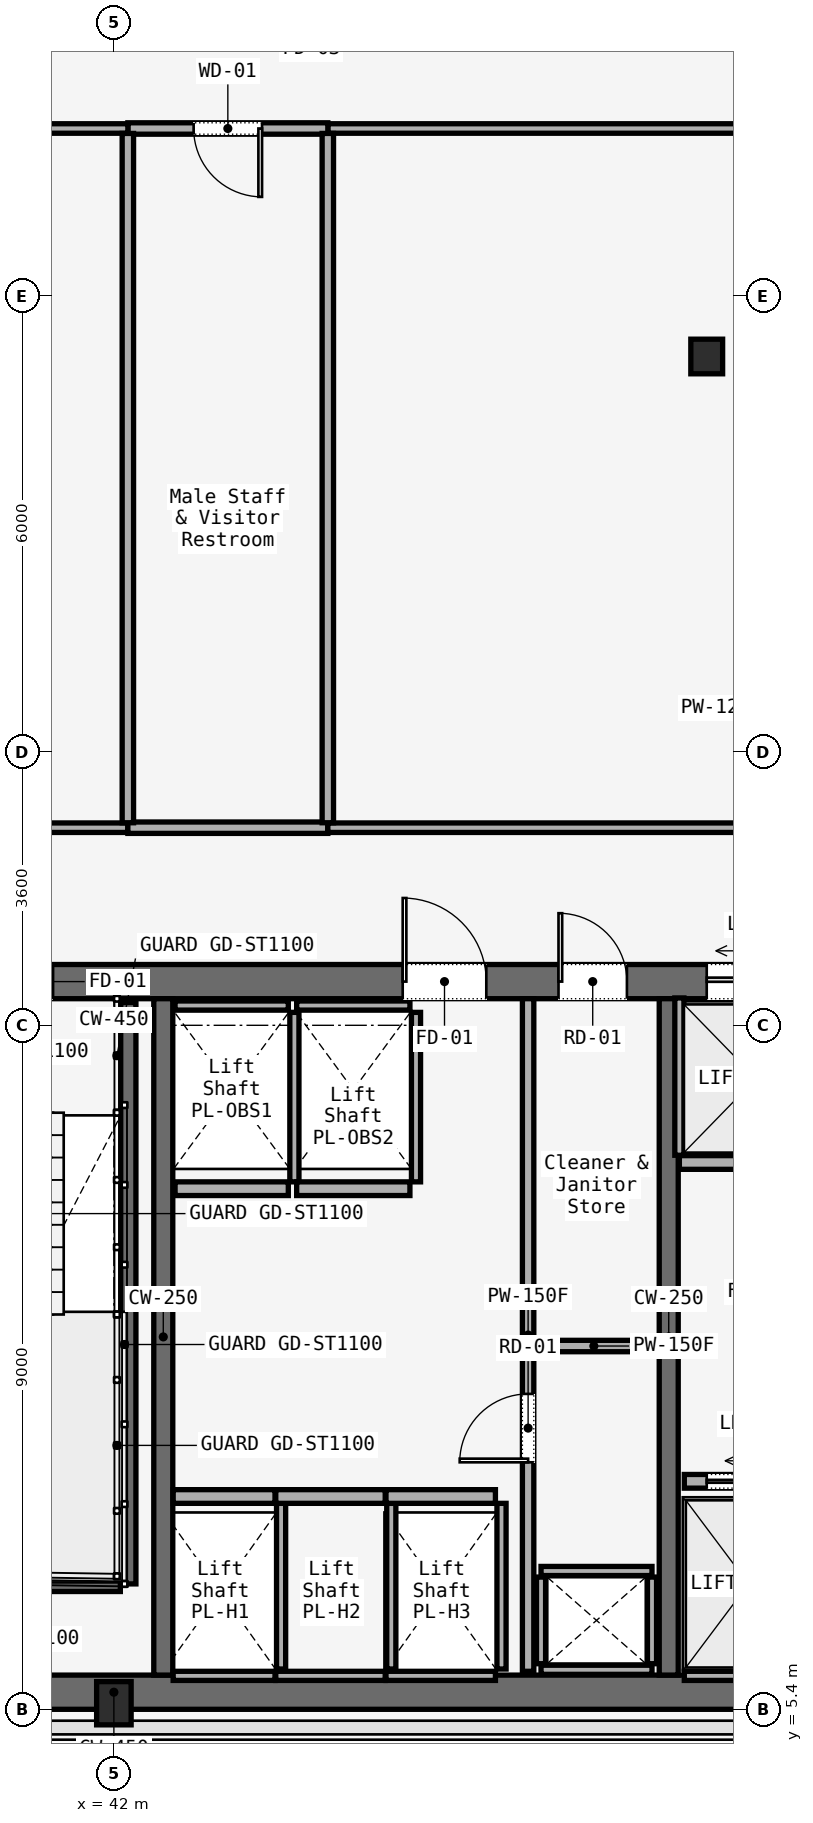
"""IFC4 building model, lengths in metres.
Left out: names, types, materials, properties, quantities, classifications, styles, units other than length and angle.
Written with IfcOpenShell. Run it as: python <this file> out.ifc"""

import sys

from ifc_helpers import new_model, si_unit, direction, frame, frame_2d, origin, origin_2d, place, context, subcontext, project, spatial, rectangle, i_section, extrude, element, fill, save


model = new_model("IFC4")
c1 = context("Model", 3, precision=1e-05, world=origin(), true_north=direction((0.0, 1.0)))
c2 = subcontext(c1, "Body", "Model", "MODEL_VIEW")
j1 = project(units=[si_unit("LENGTHUNIT", "METRE"), si_unit("PLANEANGLEUNIT", "RADIAN")], contexts=[c1])
p1 = place(None, origin())
s1 = spatial("IfcSite", under=j1, at=p1, CompositionType="ELEMENT")
p2 = place(p1, origin())
s2 = spatial("IfcBuilding", under=s1, at=p2, CompositionType="ELEMENT")
p3 = place(p2, frame((0.0, 0.0, 66.4)))
s3 = spatial("IfcBuildingStorey", under=s2, at=p3, CompositionType="ELEMENT", Elevation=66.4)
p4 = place(p3, frame((26.45, 14.975, 0.0), z_axis=(0.0, 0.0, 1.0), x_axis=(1.0, 0.0, 0.0)))
e1 = element("IfcWall", 1, at=p4, inside=s3, PredefinedType="SOLIDWALL", context=c2, shape_type="SweptSolid", body=[
    extrude(rectangle(XDim=31.1, YDim=0.45, at=frame_2d((15.55, 0.0))), origin(), (0.0, 0.0, 1.0), 3.58),
])
p5 = place(p4, frame((1.65, 0.0, 0.0)))
e2 = element("IfcOpeningElement", 2, at=p5, cuts=e1, PredefinedType="OPENING", context=c2, shape_type="SweptSolid", body=[
    extrude(rectangle(XDim=1.1, YDim=2.2, at=frame_2d((0.55, 1.1))), frame((0.0, 0.225, 0.0), z_axis=(0.0, -1.0, 0.0), x_axis=(1.0, 0.0, 0.0)), (0.0, 0.0, 1.0), 0.45),
])
p6 = place(p4, frame((13.65, 0.0, 0.0)))
e3 = element("IfcOpeningElement", 3, at=p6, cuts=e1, PredefinedType="OPENING", context=c2, shape_type="SweptSolid", body=[
    extrude(rectangle(XDim=1.1, YDim=2.2, at=frame_2d((0.55, 1.1))), frame((0.0, 0.225, 0.0), z_axis=(0.0, -1.0, 0.0), x_axis=(1.0, 0.0, 0.0)), (0.0, 0.0, 1.0), 0.45),
])
p7 = place(p4, frame((25.55, 0.0, 0.0)))
e4 = element("IfcOpeningElement", 4, at=p7, cuts=e1, PredefinedType="OPENING", context=c2, shape_type="SweptSolid", body=[
    extrude(rectangle(XDim=1.1, YDim=2.2, at=frame_2d((0.55, 1.1))), frame((0.0, 0.225, 0.0), z_axis=(0.0, -1.0, 0.0), x_axis=(1.0, 0.0, 0.0)), (0.0, 0.0, 1.0), 0.45),
])
p8 = place(p4, frame((10.7, 0.0, 0.0)))
e5 = element("IfcOpeningElement", 5, at=p8, cuts=e1, PredefinedType="OPENING", context=c2, shape_type="SweptSolid", body=[
    extrude(rectangle(XDim=1.4, YDim=2.2, at=frame_2d((0.7, 1.1))), frame((0.0, 0.225, 0.0), z_axis=(0.0, -1.0, 0.0), x_axis=(1.0, 0.0, 0.0)), (0.0, 0.0, 1.0), 0.45),
])
p9 = place(p4, frame((19.35, 0.0, 0.0)))
e6 = element("IfcOpeningElement", 6, at=p9, cuts=e1, PredefinedType="OPENING", context=c2, shape_type="SweptSolid", body=[
    extrude(rectangle(XDim=1.1, YDim=2.2, at=frame_2d((0.55, 1.1))), frame((0.0, 0.225, 0.0), z_axis=(0.0, -1.0, 0.0), x_axis=(1.0, 0.0, 0.0)), (0.0, 0.0, 1.0), 0.45),
])
p10 = place(p4, frame((21.4, 0.0, 0.0)))
e7 = element("IfcOpeningElement", 7, at=p10, cuts=e1, PredefinedType="OPENING", context=c2, shape_type="SweptSolid", body=[
    extrude(rectangle(XDim=0.9, YDim=2.1, at=frame_2d((0.45, 1.05))), frame((0.0, 0.225, 0.0), z_axis=(0.0, -1.0, 0.0), x_axis=(1.0, 0.0, 0.0)), (0.0, 0.0, 1.0), 0.45),
])
p11 = place(p4, frame((23.35, 0.0, 0.0)))
e8 = element("IfcOpeningElement", 8, at=p11, cuts=e1, PredefinedType="OPENING", context=c2, shape_type="SweptSolid", body=[
    extrude(rectangle(XDim=1.3, YDim=2.3, at=frame_2d((0.65, 1.15))), frame((0.0, 0.225, 0.0), z_axis=(0.0, -1.0, 0.0), x_axis=(1.0, 0.0, 0.0)), (0.0, 0.0, 1.0), 0.45),
])
p12 = place(p3, frame((26.45, 5.625, 0.0), z_axis=(0.0, 0.0, 1.0), x_axis=(1.0, 0.0, 0.0)))
e9 = element("IfcWall", 9, at=p12, inside=s3, PredefinedType="SOLIDWALL", context=c2, shape_type="SweptSolid", body=[
    extrude(rectangle(XDim=31.1, YDim=0.45, at=frame_2d((15.55, 0.0))), origin(), (0.0, 0.0, 1.0), 3.58),
])
for number, where, z_axis, x_axis in (
    (10, (42.65, 5.85, 0.0), (0.0, 0.0, 1.0), (0.0, 1.0, 0.0)),
    (11, (49.3, 5.85, 0.0), (0.0, 0.0, 1.0), (0.0, 1.0, 0.0)),
):
    element("IfcWall", number, at=place(p3, frame(where, z_axis=z_axis, x_axis=x_axis)), inside=s3, PredefinedType="SOLIDWALL", context=c2, shape_type="SweptSolid", body=[
        extrude(rectangle(XDim=8.9, YDim=0.25, at=frame_2d((4.45, 0.0))), origin(), (0.0, 0.0, 1.0), 3.58),
    ])
p13 = place(p3, frame((49.8, 23.2, 0.0), z_axis=(0.0, 0.0, 1.0), x_axis=(1.0, 0.0, 0.0)))
e12 = element("IfcColumn", 12, at=p13, inside=s3, PredefinedType="COLUMN", context=c2, shape_type="SweptSolid", body=[
    extrude(i_section(OverallWidth=0.418, OverallDepth=0.456, WebThickness=0.042, FlangeThickness=0.067, FilletRadius=0.015, at=origin_2d()), origin(), (0.0, 0.0, 1.0), 3.58),
])
p14 = place(p3, frame((42.0, 5.48, 0.0), z_axis=(0.0, 0.0, 1.0), x_axis=(1.0, 0.0, 0.0)))
e13 = element("IfcColumn", 13, at=p14, inside=s3, PredefinedType="COLUMN", context=c2, shape_type="SweptSolid", body=[
    extrude(i_section(OverallWidth=0.454, OverallDepth=0.569, WebThickness=0.078, FlangeThickness=0.08, FilletRadius=0.015, at=origin_2d()), origin(), (0.0, 0.0, 1.0), 3.58),
])
p15 = place(p3, frame((42.19, 14.7, 0.0), z_axis=(0.0, 0.0, 1.0), x_axis=(0.0, -1.0, 0.0)))
e14 = element("IfcWall", 14, at=p15, inside=s3, PredefinedType="SOLIDWALL", context=c2, shape_type="SweptSolid", body=[
    extrude(rectangle(XDim=7.65, YDim=0.2, at=frame_2d((3.825, 0.0))), origin(), (0.0, 0.0, 1.0), 3.8),
])
p16 = place(p3, frame((38.97, 7.05, 0.0), z_axis=(0.0, 0.0, 1.0), x_axis=(1.0, 0.0, 0.0)))
e15 = element("IfcWall", 15, at=p16, inside=s3, PredefinedType="SOLIDWALL", context=c2, shape_type="SweptSolid", body=[
    extrude(rectangle(XDim=3.115, YDim=0.2, at=frame_2d((1.558, 0.0))), origin(), (0.0, 0.0, 1.0), 3.8),
])
for number, where, z_axis, x_axis in (
    (16, (47.62, 5.92, 0.0), (0.0, 0.0, 1.0), (1.0, 0.0, 0.0)),
    (17, (47.62, 7.22, 0.0), (0.0, 0.0, 1.0), (1.0, 0.0, 0.0)),
):
    element("IfcWall", number, at=place(p3, frame(where, z_axis=z_axis, x_axis=x_axis)), inside=s3, PredefinedType="SOLIDWALL", context=c2, shape_type="SweptSolid", body=[
        extrude(rectangle(XDim=1.46, YDim=0.12, at=frame_2d((0.73, 0.0))), origin(), (0.0, 0.0, 1.0), 2.95),
    ])
for number, where, z_axis, x_axis in (
    (18, (47.62, 6.0, 0.0), (0.0, 0.0, 1.0), (0.0, 1.0, 0.0)),
    (19, (49.08, 6.0, 0.0), (0.0, 0.0, 1.0), (0.0, 1.0, 0.0)),
):
    element("IfcWall", number, at=place(p3, frame(where, z_axis=z_axis, x_axis=x_axis)), inside=s3, PredefinedType="SOLIDWALL", context=c2, shape_type="SweptSolid", body=[
        extrude(rectangle(XDim=1.14, YDim=0.12, at=frame_2d((0.57, 0.0))), origin(), (0.0, 0.0, 1.0), 2.95),
    ])
p17 = place(p3, frame((47.45, 5.9, 0.0), z_axis=(0.0, 0.0, 1.0), x_axis=(0.0, 1.0, 0.0)))
e20 = element("IfcWall", 20, at=p17, inside=s3, PredefinedType="PARTITIONING", context=c2, shape_type="SweptSolid", body=[
    extrude(rectangle(XDim=8.85, YDim=0.15, at=frame_2d((4.425, 0.0))), origin(), (0.0, 0.0, 1.0), 2.95),
])
p18 = place(p17, frame((2.75, 0.0, 0.0)))
e21 = element("IfcOpeningElement", 21, at=p18, cuts=e20, PredefinedType="OPENING", context=c2, shape_type="SweptSolid", body=[
    extrude(rectangle(XDim=0.9, YDim=2.1, at=frame_2d((0.45, 1.05))), frame((0.0, 0.075, 0.0), z_axis=(0.0, -1.0, 0.0), x_axis=(1.0, 0.0, 0.0)), (0.0, 0.0, 1.0), 0.15),
])
p19 = place(p3, frame((47.45, 10.18, 0.0), z_axis=(0.0, 0.0, 1.0), x_axis=(1.0, 0.0, 0.0)))
e22 = element("IfcWall", 22, at=p19, inside=s3, PredefinedType="PARTITIONING", context=c2, shape_type="SweptSolid", body=[
    extrude(rectangle(XDim=1.73, YDim=0.15, at=frame_2d((0.865, 0.0))), origin(), (0.0, 0.0, 1.0), 2.95),
])
p20 = place(p3, frame((42.78, 8.2, 0.0), z_axis=(0.0, 0.0, 1.0), x_axis=(1.0, 0.0, 0.0)))
e23 = element("IfcWall", 23, at=p20, inside=s3, PredefinedType="SOLIDWALL", context=c2, shape_type="SweptSolid", body=[
    extrude(rectangle(XDim=1.34, YDim=0.18, at=frame_2d((0.67, 0.0))), origin(), (0.0, 0.0, 1.0), 2.95),
])
p21 = place(p3, frame((42.78, 5.84, 0.0), z_axis=(0.0, 0.0, 1.0), x_axis=(1.0, 0.0, 0.0)))
e24 = element("IfcWall", 24, at=p21, inside=s3, PredefinedType="SOLIDWALL", context=c2, shape_type="SweptSolid", body=[
    extrude(rectangle(XDim=1.34, YDim=0.12, at=frame_2d((0.67, 0.0))), origin(), (0.0, 0.0, 1.0), 2.95),
])
p22 = place(p3, frame((44.2, 5.93, 0.0), z_axis=(0.0, 0.0, 1.0), x_axis=(0.0, 1.0, 0.0)))
e25 = element("IfcWall", 25, at=p22, inside=s3, PredefinedType="SOLIDWALL", context=c2, shape_type="SweptSolid", body=[
    extrude(rectangle(XDim=2.18, YDim=0.12, at=frame_2d((1.09, 0.0))), origin(), (0.0, 0.0, 1.0), 2.95),
])
p23 = place(p3, frame((44.13, 8.2, 0.0), z_axis=(0.0, 0.0, 1.0), x_axis=(1.0, 0.0, 0.0)))
e26 = element("IfcWall", 26, at=p23, inside=s3, PredefinedType="SOLIDWALL", context=c2, shape_type="SweptSolid", body=[
    extrude(rectangle(XDim=1.44, YDim=0.18, at=frame_2d((0.72, 0.0))), origin(), (0.0, 0.0, 1.0), 2.95),
])
p24 = place(p3, frame((44.13, 5.84, 0.0), z_axis=(0.0, 0.0, 1.0), x_axis=(1.0, 0.0, 0.0)))
e27 = element("IfcWall", 27, at=p24, inside=s3, PredefinedType="SOLIDWALL", context=c2, shape_type="SweptSolid", body=[
    extrude(rectangle(XDim=1.44, YDim=0.12, at=frame_2d((0.72, 0.0))), origin(), (0.0, 0.0, 1.0), 2.95),
])
p25 = place(p3, frame((45.65, 5.93, 0.0), z_axis=(0.0, 0.0, 1.0), x_axis=(0.0, 1.0, 0.0)))
e28 = element("IfcWall", 28, at=p25, inside=s3, PredefinedType="SOLIDWALL", context=c2, shape_type="SweptSolid", body=[
    extrude(rectangle(XDim=2.18, YDim=0.12, at=frame_2d((1.09, 0.0))), origin(), (0.0, 0.0, 1.0), 2.95),
])
p26 = place(p3, frame((45.58, 8.2, 0.0), z_axis=(0.0, 0.0, 1.0), x_axis=(1.0, 0.0, 0.0)))
e29 = element("IfcWall", 29, at=p26, inside=s3, PredefinedType="SOLIDWALL", context=c2, shape_type="SweptSolid", body=[
    extrude(rectangle(XDim=1.44, YDim=0.18, at=frame_2d((0.72, 0.0))), origin(), (0.0, 0.0, 1.0), 2.95),
])
p27 = place(p3, frame((45.58, 5.84, 0.0), z_axis=(0.0, 0.0, 1.0), x_axis=(1.0, 0.0, 0.0)))
e30 = element("IfcWall", 30, at=p27, inside=s3, PredefinedType="SOLIDWALL", context=c2, shape_type="SweptSolid", body=[
    extrude(rectangle(XDim=1.44, YDim=0.12, at=frame_2d((0.72, 0.0))), origin(), (0.0, 0.0, 1.0), 2.95),
])
p28 = place(p3, frame((47.1, 5.93, 0.0), z_axis=(0.0, 0.0, 1.0), x_axis=(0.0, 1.0, 0.0)))
e31 = element("IfcWall", 31, at=p28, inside=s3, PredefinedType="SOLIDWALL", context=c2, shape_type="SweptSolid", body=[
    extrude(rectangle(XDim=2.18, YDim=0.12, at=frame_2d((1.09, 0.0))), origin(), (0.0, 0.0, 1.0), 2.95),
])
p29 = place(p3, frame((42.805, 12.25, 0.0), z_axis=(0.0, 0.0, 1.0), x_axis=(1.0, 0.0, 0.0)))
e32 = element("IfcWall", 32, at=p29, inside=s3, PredefinedType="SOLIDWALL", context=c2, shape_type="SweptSolid", body=[
    extrude(rectangle(XDim=1.49, YDim=0.18, at=frame_2d((0.745, 0.0))), origin(), (0.0, 0.0, 1.0), 2.95),
])
p30 = place(p3, frame((42.805, 14.66, 0.0), z_axis=(0.0, 0.0, 1.0), x_axis=(1.0, 0.0, 0.0)))
e33 = element("IfcWall", 33, at=p30, inside=s3, PredefinedType="SOLIDWALL", context=c2, shape_type="SweptSolid", body=[
    extrude(rectangle(XDim=1.49, YDim=0.12, at=frame_2d((0.745, 0.0))), origin(), (0.0, 0.0, 1.0), 2.95),
])
p31 = place(p3, frame((44.375, 12.34, 0.0), z_axis=(0.0, 0.0, 1.0), x_axis=(0.0, 1.0, 0.0)))
e34 = element("IfcWall", 34, at=p31, inside=s3, PredefinedType="SOLIDWALL", context=c2, shape_type="SweptSolid", body=[
    extrude(rectangle(XDim=2.23, YDim=0.12, at=frame_2d((1.115, 0.0))), origin(), (0.0, 0.0, 1.0), 2.95),
])
p32 = place(p3, frame((44.405, 12.25, 0.0), z_axis=(0.0, 0.0, 1.0), x_axis=(1.0, 0.0, 0.0)))
e35 = element("IfcWall", 35, at=p32, inside=s3, PredefinedType="SOLIDWALL", context=c2, shape_type="SweptSolid", body=[
    extrude(rectangle(XDim=1.49, YDim=0.18, at=frame_2d((0.745, 0.0))), origin(), (0.0, 0.0, 1.0), 2.95),
])
p33 = place(p3, frame((44.405, 14.66, 0.0), z_axis=(0.0, 0.0, 1.0), x_axis=(1.0, 0.0, 0.0)))
e36 = element("IfcWall", 36, at=p33, inside=s3, PredefinedType="SOLIDWALL", context=c2, shape_type="SweptSolid", body=[
    extrude(rectangle(XDim=1.49, YDim=0.12, at=frame_2d((0.745, 0.0))), origin(), (0.0, 0.0, 1.0), 2.95),
])
p34 = place(p3, frame((45.975, 12.34, 0.0), z_axis=(0.0, 0.0, 1.0), x_axis=(0.0, 1.0, 0.0)))
e37 = element("IfcWall", 37, at=p34, inside=s3, PredefinedType="SOLIDWALL", context=c2, shape_type="SweptSolid", body=[
    extrude(rectangle(XDim=2.23, YDim=0.12, at=frame_2d((1.115, 0.0))), origin(), (0.0, 0.0, 1.0), 2.95),
])
p35 = place(p3, frame((49.505, 8.4, 0.0), z_axis=(0.0, 0.0, 1.0), x_axis=(1.0, 0.0, 0.0)))
e38 = element("IfcWall", 38, at=p35, inside=s3, PredefinedType="SOLIDWALL", context=c2, shape_type="SweptSolid", body=[
    extrude(rectangle(XDim=1.69, YDim=0.18, at=frame_2d((0.845, 0.0))), origin(), (0.0, 0.0, 1.0), 2.95),
])
p36 = place(p35, frame((0.295, 0.0, 0.0)))
e39 = element("IfcOpeningElement", 39, at=p36, cuts=e38, PredefinedType="OPENING", context=c2, shape_type="SweptSolid", body=[
    extrude(rectangle(XDim=1.1, YDim=2.2, at=frame_2d((0.55, 1.1))), frame((0.0, 0.09, 0.0), z_axis=(0.0, -1.0, 0.0), x_axis=(1.0, 0.0, 0.0)), (0.0, 0.0, 1.0), 0.18),
])
p37 = place(p3, frame((49.505, 5.84, 0.0), z_axis=(0.0, 0.0, 1.0), x_axis=(1.0, 0.0, 0.0)))
e40 = element("IfcWall", 40, at=p37, inside=s3, PredefinedType="SOLIDWALL", context=c2, shape_type="SweptSolid", body=[
    extrude(rectangle(XDim=1.69, YDim=0.12, at=frame_2d((0.845, 0.0))), origin(), (0.0, 0.0, 1.0), 2.95),
])
p38 = place(p3, frame((49.44, 12.595, 0.0), z_axis=(0.0, 0.0, 1.0), x_axis=(1.0, 0.0, 0.0)))
e41 = element("IfcWall", 41, at=p38, inside=s3, PredefinedType="SOLIDWALL", context=c2, shape_type="SweptSolid", body=[
    extrude(rectangle(XDim=2.04, YDim=0.18, at=frame_2d((1.02, 0.0))), origin(), (0.0, 0.0, 1.0), 2.95),
])
p39 = place(p3, frame((49.44, 12.69, 0.0), z_axis=(0.0, 0.0, 1.0), x_axis=(0.0, 1.0, 0.0)))
e42 = element("IfcWall", 42, at=p39, inside=s3, PredefinedType="SOLIDWALL", context=c2, shape_type="SweptSolid", body=[
    extrude(rectangle(XDim=2.07, YDim=0.12, at=frame_2d((1.035, 0.0))), origin(), (0.0, 0.0, 1.0), 2.95),
])
p40 = place(p3, frame((56.735, 26.2, 0.0), z_axis=(0.0, 0.0, 1.0), x_axis=(-1.0, 0.0, 0.0)))
e43 = element("IfcWall", 43, at=p40, inside=s3, PredefinedType="PARTITIONING", context=c2, shape_type="SweptSolid", body=[
    extrude(rectangle(XDim=11.92, YDim=0.125, at=frame_2d((5.96, 0.0))), origin(), (0.0, 0.0, 1.0), 2.95),
])
p41 = place(p3, frame((44.815, 26.2, 0.0), z_axis=(0.0, 0.0, 1.0), x_axis=(-1.0, 0.0, 0.0)))
e44 = element("IfcWall", 44, at=p41, inside=s3, PredefinedType="PARTITIONING", context=c2, shape_type="SweptSolid", body=[
    extrude(rectangle(XDim=2.631, YDim=0.15, at=frame_2d((1.315, 0.0))), origin(), (0.0, 0.0, 1.0), 2.95),
])
p42 = place(p41, frame((0.865, 0.0, 0.0)))
e45 = element("IfcOpeningElement", 45, at=p42, cuts=e44, PredefinedType="OPENING", context=c2, shape_type="SweptSolid", body=[
    extrude(rectangle(XDim=0.9, YDim=2.15, at=frame_2d((0.45, 1.075))), frame((0.0, 0.075, 0.0), z_axis=(0.0, -1.0, 0.0), x_axis=(1.0, 0.0, 0.0)), (0.0, 0.0, 1.0), 0.15),
])
p43 = place(p3, frame((42.184, 26.2, 0.0), z_axis=(0.0, 0.0, 1.0), x_axis=(-1.0, 0.0, 0.0)))
e46 = element("IfcWall", 46, at=p43, inside=s3, PredefinedType="PARTITIONING", context=c2, shape_type="SweptSolid", body=[
    extrude(rectangle(XDim=10.584, YDim=0.125, at=frame_2d((5.292, 0.0))), origin(), (0.0, 0.0, 1.0), 2.95),
])
p44 = place(p43, frame((4.817, 0.0, 0.0)))
e47 = element("IfcOpeningElement", 47, at=p44, cuts=e46, PredefinedType="OPENING", context=c2, shape_type="SweptSolid", body=[
    extrude(rectangle(XDim=0.95, YDim=2.2, at=frame_2d((0.475, 1.1))), frame((0.0, 0.062, 0.0), z_axis=(0.0, -1.0, 0.0), x_axis=(1.0, 0.0, 0.0)), (0.0, 0.0, 1.0), 0.125),
])
p45 = place(p3, frame((31.665, 17.0, 0.0), z_axis=(0.0, 0.0, 1.0), x_axis=(1.0, 0.0, 0.0)))
e48 = element("IfcWall", 48, at=p45, inside=s3, PredefinedType="PARTITIONING", context=c2, shape_type="SweptSolid", body=[
    extrude(rectangle(XDim=10.519, YDim=0.125, at=frame_2d((5.26, 0.0))), origin(), (0.0, 0.0, 1.0), 2.95),
])
p46 = place(p3, frame((42.184, 17.0, 0.0), z_axis=(0.0, 0.0, 1.0), x_axis=(1.0, 0.0, 0.0)))
e49 = element("IfcWall", 49, at=p46, inside=s3, PredefinedType="PARTITIONING", context=c2, shape_type="SweptSolid", body=[
    extrude(rectangle(XDim=2.631, YDim=0.15, at=frame_2d((1.315, 0.0))), origin(), (0.0, 0.0, 1.0), 2.95),
])
p47 = place(p3, frame((44.815, 17.0, 0.0), z_axis=(0.0, 0.0, 1.0), x_axis=(1.0, 0.0, 0.0)))
e50 = element("IfcWall", 50, at=p47, inside=s3, PredefinedType="PARTITIONING", context=c2, shape_type="SweptSolid", body=[
    extrude(rectangle(XDim=11.985, YDim=0.125, at=frame_2d((5.993, 0.0))), origin(), (0.0, 0.0, 1.0), 2.95),
])
p48 = place(p47, frame((5.518, 0.0, 0.0)))
e51 = element("IfcOpeningElement", 51, at=p48, cuts=e50, PredefinedType="OPENING", context=c2, shape_type="SweptSolid", body=[
    extrude(rectangle(XDim=0.95, YDim=2.2, at=frame_2d((0.475, 1.1))), frame((0.0, 0.062, 0.0), z_axis=(0.0, -1.0, 0.0), x_axis=(1.0, 0.0, 0.0)), (0.0, 0.0, 1.0), 0.125),
])
for number, where, z_axis, x_axis in (
    (52, (42.184, 26.135, 0.0), (0.0, 0.0, 1.0), (0.0, -1.0, 0.0)),
    (53, (44.815, 26.135, 0.0), (0.0, 0.0, 1.0), (0.0, -1.0, 0.0)),
):
    element("IfcWall", number, at=place(p3, frame(where, z_axis=z_axis, x_axis=x_axis)), inside=s3, PredefinedType="PARTITIONING", context=c2, shape_type="SweptSolid", body=[
        extrude(rectangle(XDim=9.07, YDim=0.15, at=frame_2d((4.535, 0.0))), origin(), (0.0, 0.0, 1.0), 2.95),
    ])
p49 = place(p6, origin())
e54 = element("IfcDoor", 54, at=p49, inside=s3, OperationType="SINGLE_SWING_RIGHT", PredefinedType="DOOR", context=c2, shape_type="SweptSolid", body=[
    extrude(rectangle(XDim=1.1, YDim=2.2, at=frame_2d((0.55, 1.1))), frame((0.0, 0.025, 0.0), z_axis=(0.0, -1.0, 0.0), x_axis=(1.0, 0.0, 0.0)), (0.0, 0.0, 1.0), 0.05),
])
fill(e3, e54)
p50 = place(p9, origin())
e55 = element("IfcDoor", 55, at=p50, inside=s3, OperationType="SINGLE_SWING_LEFT", PredefinedType="DOOR", context=c2, shape_type="SweptSolid", body=[
    extrude(rectangle(XDim=1.1, YDim=2.2, at=frame_2d((0.55, 1.1))), frame((0.0, 0.025, 0.0), z_axis=(0.0, -1.0, 0.0), x_axis=(1.0, 0.0, 0.0)), (0.0, 0.0, 1.0), 0.05),
])
fill(e6, e55)
p51 = place(p10, origin())
e56 = element("IfcDoor", 56, at=p51, inside=s3, OperationType="SINGLE_SWING_LEFT", PredefinedType="DOOR", context=c2, shape_type="SweptSolid", body=[
    extrude(rectangle(XDim=0.9, YDim=2.1, at=frame_2d((0.45, 1.05))), frame((0.0, 0.025, 0.0), z_axis=(0.0, -1.0, 0.0), x_axis=(1.0, 0.0, 0.0)), (0.0, 0.0, 1.0), 0.05),
])
fill(e7, e56)
p52 = place(p18, origin())
e57 = element("IfcDoor", 57, at=p52, inside=s3, OperationType="SINGLE_SWING_RIGHT", PredefinedType="DOOR", context=c2, shape_type="SweptSolid", body=[
    extrude(rectangle(XDim=0.9, YDim=2.1, at=frame_2d((0.45, 1.05))), frame((0.0, 0.025, 0.0), z_axis=(0.0, -1.0, 0.0), x_axis=(1.0, 0.0, 0.0)), (0.0, 0.0, 1.0), 0.05),
])
fill(e21, e57)
p53 = place(p36, origin())
e58 = element("IfcDoor", 58, at=p53, inside=s3, OperationType="SLIDING_TO_LEFT", PredefinedType="DOOR", context=c2, shape_type="SweptSolid", body=[
    extrude(rectangle(XDim=1.1, YDim=2.2, at=frame_2d((0.55, 1.1))), frame((0.0, 0.025, 0.0), z_axis=(0.0, -1.0, 0.0), x_axis=(1.0, 0.0, 0.0)), (0.0, 0.0, 1.0), 0.05),
])
fill(e39, e58)
p54 = place(p11, origin())
e59 = element("IfcDoor", 59, at=p54, inside=s3, OperationType="DOUBLE_DOOR_SLIDING", PredefinedType="DOOR", context=c2, shape_type="SweptSolid", body=[
    extrude(rectangle(XDim=1.3, YDim=2.3, at=frame_2d((0.65, 1.15))), frame((0.0, 0.025, 0.0), z_axis=(0.0, -1.0, 0.0), x_axis=(1.0, 0.0, 0.0)), (0.0, 0.0, 1.0), 0.05),
])
fill(e8, e59)
p55 = place(p42, origin())
e60 = element("IfcDoor", 60, at=p55, inside=s3, OperationType="SINGLE_SWING_LEFT", PredefinedType="DOOR", context=c2, shape_type="SweptSolid", body=[
    extrude(rectangle(XDim=0.9, YDim=2.15, at=frame_2d((0.45, 1.075))), frame((0.0, 0.025, 0.0), z_axis=(0.0, -1.0, 0.0), x_axis=(1.0, 0.0, 0.0)), (0.0, 0.0, 1.0), 0.05),
])
fill(e45, e60)
save(model, sys.argv[1])
